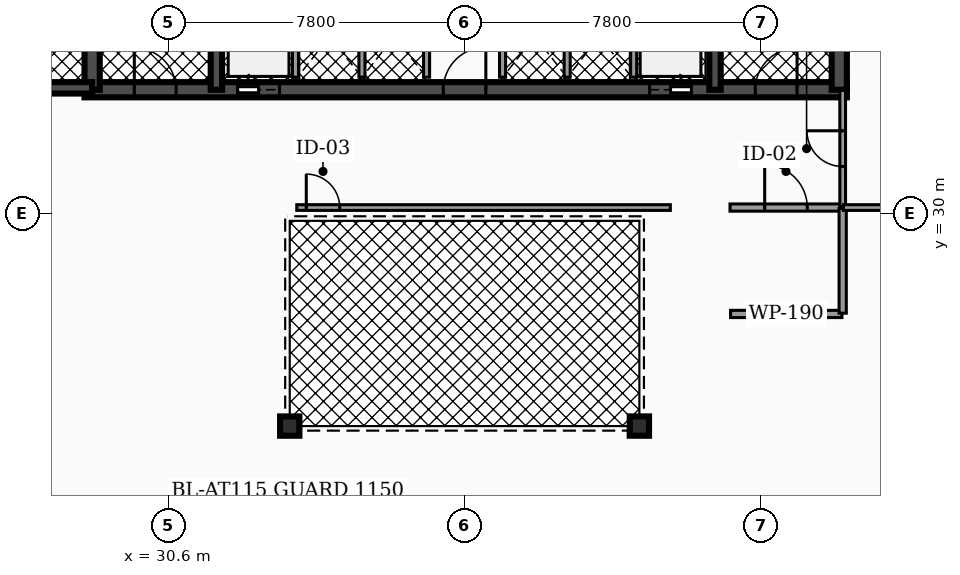
"""IFC4 building model, lengths in metres.
Left out: names, types, materials, properties, quantities, classifications, styles, units other than length and angle.
Written with IfcOpenShell. Run it as: python <this file> out.ifc"""

import sys

from ifc_helpers import new_model, si_unit, direction, frame, frame_2d, origin, origin_2d, place, context, subcontext, project, spatial, rectangle, hollow_circle, extrude, element, fill, save


model = new_model("IFC4")
c1 = context("Model", 3, precision=1e-05, world=origin(), true_north=direction((0.0, 1.0)))
c2 = subcontext(c1, "Body", "Model", "MODEL_VIEW")
j1 = project(units=[si_unit("LENGTHUNIT", "METRE"), si_unit("PLANEANGLEUNIT", "RADIAN")], contexts=[c1])
p1 = place(None, origin())
s1 = spatial("IfcSite", under=j1, at=p1, CompositionType="ELEMENT")
p2 = place(p1, origin())
s2 = spatial("IfcBuilding", under=s1, at=p2, CompositionType="ELEMENT")
p3 = place(p2, frame((0.0, 0.0, 43.86)))
s3 = spatial("IfcBuildingStorey", under=s2, at=p3, CompositionType="ELEMENT", Elevation=43.86)
p4 = place(p3, frame((28.4, 33.25, 0.0), z_axis=(0.0, 0.0, 1.0), x_axis=(1.0, 0.0, 0.0)))
e1 = element("IfcWall", 1, at=p4, inside=s3, PredefinedType="SHEAR", context=c2, shape_type="SweptSolid", body=[
    extrude(rectangle(XDim=20.06, YDim=0.4, at=frame_2d((10.03, 0.0))), origin(), (0.0, 0.0, 1.0), 3.82),
])
p5 = place(p4, frame((4.03, 0.0, 0.0)))
e2 = element("IfcOpeningElement", 2, at=p5, cuts=e1, PredefinedType="OPENING", context=c2, shape_type="SweptSolid", body=[
    extrude(rectangle(XDim=1.1, YDim=2.15, at=frame_2d((0.55, 1.075))), frame((0.0, 0.21, 0.0), z_axis=(0.0, -1.0, 0.0), x_axis=(1.0, 0.0, 0.0)), (0.0, 0.0, 1.0), 0.42),
])
p6 = place(p4, frame((14.87, 0.0, 0.0)))
e3 = element("IfcOpeningElement", 3, at=p6, cuts=e1, PredefinedType="OPENING", context=c2, shape_type="SweptSolid", body=[
    extrude(rectangle(XDim=1.1, YDim=2.15, at=frame_2d((0.55, 1.075))), frame((0.0, 0.21, 0.0), z_axis=(0.0, -1.0, 0.0), x_axis=(1.0, 0.0, 0.0)), (0.0, 0.0, 1.0), 0.42),
])
p7 = place(p4, frame((1.31, 0.0, 0.0)))
e4 = element("IfcOpeningElement", 4, at=p7, cuts=e1, PredefinedType="OPENING", context=c2, shape_type="SweptSolid", body=[
    extrude(rectangle(XDim=1.1, YDim=2.2, at=frame_2d((0.55, 1.1))), frame((0.0, 0.21, 0.0), z_axis=(0.0, -1.0, 0.0), x_axis=(1.0, 0.0, 0.0)), (0.0, 0.0, 1.0), 0.42),
])
p8 = place(p4, frame((9.44, 0.0, 0.0)))
e5 = element("IfcOpeningElement", 5, at=p8, cuts=e1, PredefinedType="OPENING", context=c2, shape_type="SweptSolid", body=[
    extrude(rectangle(XDim=1.12, YDim=2.05, at=frame_2d((0.56, 1.025))), frame((0.0, 0.21, 0.0), z_axis=(0.0, -1.0, 0.0), x_axis=(1.0, 0.0, 0.0)), (0.0, 0.0, 1.0), 0.42),
])
p9 = place(p4, frame((17.65, 0.0, 0.0)))
e6 = element("IfcOpeningElement", 6, at=p9, cuts=e1, PredefinedType="OPENING", context=c2, shape_type="SweptSolid", body=[
    extrude(rectangle(XDim=1.1, YDim=2.2, at=frame_2d((0.55, 1.1))), frame((0.0, 0.21, 0.0), z_axis=(0.0, -1.0, 0.0), x_axis=(1.0, 0.0, 0.0)), (0.0, 0.0, 1.0), 0.42),
])
p10 = place(p3, frame((28.6, 33.25, 0.0), z_axis=(0.0, 0.0, 1.0), x_axis=(0.0, 1.0, 0.0)))
e7 = element("IfcWall", 7, at=p10, inside=s3, PredefinedType="SHEAR", context=c2, shape_type="SweptSolid", body=[
    extrude(rectangle(XDim=10.2, YDim=0.4, at=frame_2d((5.1, 0.0))), origin(), (0.0, 0.0, 1.0), 3.82),
])
for number, where, z_axis, x_axis in (
    (8, (31.87, 33.25, 0.0), (0.0, 0.0, 1.0), (0.0, 1.0, 0.0)),
    (9, (44.99, 33.25, 0.0), (0.0, 0.0, 1.0), (0.0, 1.0, 0.0)),
):
    element("IfcWall", number, at=place(p3, frame(where, z_axis=z_axis, x_axis=x_axis)), inside=s3, PredefinedType="SHEAR", context=c2, shape_type="SweptSolid", body=[
        extrude(rectangle(XDim=10.2, YDim=0.3, at=frame_2d((5.1, 0.0))), origin(), (0.0, 0.0, 1.0), 3.82),
    ])
p11 = place(p3, frame((48.26, 33.25, 0.0), z_axis=(0.0, 0.0, 1.0), x_axis=(0.0, 1.0, 0.0)))
e10 = element("IfcWall", 10, at=p11, inside=s3, PredefinedType="SHEAR", context=c2, shape_type="SweptSolid", body=[
    extrude(rectangle(XDim=10.2, YDim=0.4, at=frame_2d((5.1, 0.0))), origin(), (0.0, 0.0, 1.0), 3.82),
])
p12 = place(p3, frame((25.08, 33.3, 0.0), z_axis=(0.0, 0.0, 1.0), x_axis=(1.0, 0.0, 0.0)))
e11 = element("IfcWall", 11, at=p12, inside=s3, PredefinedType="SHEAR", context=c2, shape_type="SweptSolid", body=[
    extrude(rectangle(XDim=3.52, YDim=0.3, at=frame_2d((1.76, 0.0))), origin(), (0.0, 0.0, 1.0), 3.82),
])
p13 = place(p12, frame((1.335, 0.0, 0.0)))
e12 = element("IfcOpeningElement", 12, at=p13, cuts=e11, PredefinedType="OPENING", context=c2, shape_type="SweptSolid", body=[
    extrude(rectangle(XDim=0.95, YDim=2.2, at=frame_2d((0.475, 1.1))), frame((0.0, 0.16, 0.0), z_axis=(0.0, -1.0, 0.0), x_axis=(1.0, 0.0, 0.0)), (0.0, 0.0, 1.0), 0.32),
])
for number, where, z_axis, x_axis in (
    (13, (33.8, 24.4, 0.0), (0.0, 0.0, 1.0), (1.0, 0.0, 0.0)),
    (14, (43.0, 24.4, 0.0), (0.0, 0.0, 1.0), (1.0, 0.0, 0.0)),
):
    element("IfcColumn", number, at=place(p3, frame(where, z_axis=z_axis, x_axis=x_axis)), inside=s3, PredefinedType="COLUMN", context=c2, shape_type="SweptSolid", body=[
        extrude(hollow_circle(Radius=0.254, WallThickness=0.02, at=origin_2d()), origin(), (0.0, 0.0, 1.0), 3.82),
    ])
for number, where, z_axis, x_axis in (
    (15, (33.95, 33.58, 0.0), (0.0, 0.0, 1.0), (0.0, 1.0, 0.0)),
    (16, (42.85, 33.58, 0.0), (0.0, 0.0, 1.0), (0.0, 1.0, 0.0)),
):
    element("IfcWall", number, at=place(p3, frame(where, z_axis=z_axis, x_axis=x_axis)), inside=s3, PredefinedType="SOLIDWALL", context=c2, shape_type="SweptSolid", body=[
        extrude(rectangle(XDim=2.45, YDim=0.16, at=frame_2d((1.225, 0.0))), origin(), (0.0, 0.0, 1.0), 2.792),
    ])
for number, where, z_axis, x_axis in (
    (17, (35.7, 33.58, 0.0), (0.0, 0.0, 1.0), (0.0, 1.0, 0.0)),
    (18, (37.4, 33.58, 0.0), (0.0, 0.0, 1.0), (0.0, 1.0, 0.0)),
    (19, (39.4, 33.58, 0.0), (0.0, 0.0, 1.0), (0.0, 1.0, 0.0)),
    (20, (41.1, 33.58, 0.0), (0.0, 0.0, 1.0), (0.0, 1.0, 0.0)),
):
    element("IfcWall", number, at=place(p3, frame(where, z_axis=z_axis, x_axis=x_axis)), inside=s3, PredefinedType="SOLIDWALL", context=c2, shape_type="SweptSolid", body=[
        extrude(rectangle(XDim=2.25, YDim=0.16, at=frame_2d((1.125, 0.0))), origin(), (0.0, 0.0, 1.0), 2.792),
    ])
p14 = place(p3, frame((45.385, 30.15, 0.0), z_axis=(0.0, 0.0, 1.0), x_axis=(1.0, 0.0, 0.0)))
e21 = element("IfcWall", 21, at=p14, inside=s3, PredefinedType="PARTITIONING", context=c2, shape_type="SweptSolid", body=[
    extrude(rectangle(XDim=2.945, YDim=0.19, at=frame_2d((1.473, 0.0))), origin(), (0.0, 0.0, 1.0), 2.777),
])
p15 = place(p14, frame((0.913, 0.0, 0.0)))
e22 = element("IfcOpeningElement", 22, at=p15, cuts=e21, PredefinedType="OPENING", context=c2, shape_type="SweptSolid", body=[
    extrude(rectangle(XDim=1.12, YDim=2.05, at=frame_2d((0.56, 1.025))), frame((0.0, 0.105, 0.0), z_axis=(0.0, -1.0, 0.0), x_axis=(1.0, 0.0, 0.0)), (0.0, 0.0, 1.0), 0.21),
])
p16 = place(p3, frame((48.35, 30.17, 0.0), z_axis=(0.0, 0.0, 1.0), x_axis=(0.0, 1.0, 0.0)))
e23 = element("IfcWall", 23, at=p16, inside=s3, PredefinedType="PARTITIONING", context=c2, shape_type="SweptSolid", body=[
    extrude(rectangle(XDim=3.06, YDim=0.15, at=frame_2d((1.53, 0.0))), origin(), (0.0, 0.0, 1.0), 2.777),
])
p17 = place(p16, frame((1.06, 0.0, 0.0)))
e24 = element("IfcOpeningElement", 24, at=p17, cuts=e23, PredefinedType="OPENING", context=c2, shape_type="SweptSolid", body=[
    extrude(rectangle(XDim=0.94, YDim=2.05, at=frame_2d((0.47, 1.025))), frame((0.0, 0.085, 0.0), z_axis=(0.0, -1.0, 0.0), x_axis=(1.0, 0.0, 0.0)), (0.0, 0.0, 1.0), 0.17),
])
p18 = place(p3, frame((33.985, 30.15, 0.0), z_axis=(0.0, 0.0, 1.0), x_axis=(1.0, 0.0, 0.0)))
e25 = element("IfcWall", 25, at=p18, inside=s3, PredefinedType="PARTITIONING", context=c2, shape_type="SweptSolid", body=[
    extrude(rectangle(XDim=9.83, YDim=0.15, at=frame_2d((4.915, 0.0))), origin(), (0.0, 0.0, 1.0), 2.777),
])
p19 = place(p18, frame((0.25, 0.0, 0.0)))
e26 = element("IfcOpeningElement", 26, at=p19, cuts=e25, PredefinedType="OPENING", context=c2, shape_type="SweptSolid", body=[
    extrude(rectangle(XDim=0.88, YDim=2.05, at=frame_2d((0.44, 1.025))), frame((0.0, 0.085, 0.0), z_axis=(0.0, -1.0, 0.0), x_axis=(1.0, 0.0, 0.0)), (0.0, 0.0, 1.0), 0.17),
])
p20 = place(p3, frame((45.4, 27.35, 0.0), z_axis=(0.0, 0.0, 1.0), x_axis=(1.0, 0.0, 0.0)))
e27 = element("IfcWall", 27, at=p20, inside=s3, PredefinedType="PARTITIONING", context=c2, shape_type="SweptSolid", body=[
    extrude(rectangle(XDim=2.93, YDim=0.19, at=frame_2d((1.465, 0.0))), origin(), (0.0, 0.0, 1.0), 2.777),
])
p21 = place(p3, frame((48.35, 27.37, 0.0), z_axis=(0.0, 0.0, 1.0), x_axis=(0.0, 1.0, 0.0)))
e28 = element("IfcWall", 28, at=p21, inside=s3, PredefinedType="PARTITIONING", context=c2, shape_type="SweptSolid", body=[
    extrude(rectangle(XDim=2.76, YDim=0.19, at=frame_2d((1.38, 0.0))), origin(), (0.0, 0.0, 1.0), 2.777),
])
p22 = place(p3, frame((48.37, 30.15, 0.0), z_axis=(0.0, 0.0, 1.0), x_axis=(1.0, 0.0, 0.0)))
e29 = element("IfcWall", 29, at=p22, inside=s3, PredefinedType="PARTITIONING", context=c2, shape_type="SweptSolid", body=[
    extrude(rectangle(XDim=2.06, YDim=0.15, at=frame_2d((1.03, 0.0))), origin(), (0.0, 0.0, 1.0), 2.777),
])
p23 = place(p5, origin())
e30 = element("IfcDoor", 30, at=p23, inside=s3, OperationType="SLIDING_TO_LEFT", PredefinedType="DOOR", context=c2, shape_type="SweptSolid", body=[
    extrude(rectangle(XDim=1.1, YDim=2.15, at=frame_2d((0.55, 1.075))), frame((0.0, 0.025, 0.0), z_axis=(0.0, -1.0, 0.0), x_axis=(1.0, 0.0, 0.0)), (0.0, 0.0, 1.0), 0.05),
])
fill(e2, e30)
p24 = place(p6, origin())
e31 = element("IfcDoor", 31, at=p24, inside=s3, OperationType="SLIDING_TO_RIGHT", PredefinedType="DOOR", context=c2, shape_type="SweptSolid", body=[
    extrude(rectangle(XDim=1.1, YDim=2.15, at=frame_2d((0.55, 1.075))), frame((0.0, 0.025, 0.0), z_axis=(0.0, -1.0, 0.0), x_axis=(1.0, 0.0, 0.0)), (0.0, 0.0, 1.0), 0.05),
])
fill(e3, e31)
p25 = place(p7, origin())
e32 = element("IfcDoor", 32, at=p25, inside=s3, OperationType="SINGLE_SWING_LEFT", PredefinedType="DOOR", context=c2, shape_type="SweptSolid", body=[
    extrude(rectangle(XDim=1.1, YDim=2.2, at=frame_2d((0.55, 1.1))), frame((0.0, 0.025, 0.0), z_axis=(0.0, -1.0, 0.0), x_axis=(1.0, 0.0, 0.0)), (0.0, 0.0, 1.0), 0.05),
])
fill(e4, e32)
p26 = place(p8, origin())
e33 = element("IfcDoor", 33, at=p26, inside=s3, OperationType="SINGLE_SWING_RIGHT", PredefinedType="DOOR", context=c2, shape_type="SweptSolid", body=[
    extrude(rectangle(XDim=1.12, YDim=2.05, at=frame_2d((0.56, 1.025))), frame((0.0, 0.025, 0.0), z_axis=(0.0, -1.0, 0.0), x_axis=(1.0, 0.0, 0.0)), (0.0, 0.0, 1.0), 0.05),
])
fill(e5, e33)
p27 = place(p9, origin())
e34 = element("IfcDoor", 34, at=p27, inside=s3, OperationType="SINGLE_SWING_RIGHT", PredefinedType="DOOR", context=c2, shape_type="SweptSolid", body=[
    extrude(rectangle(XDim=1.1, YDim=2.2, at=frame_2d((0.55, 1.1))), frame((0.0, 0.025, 0.0), z_axis=(0.0, -1.0, 0.0), x_axis=(1.0, 0.0, 0.0)), (0.0, 0.0, 1.0), 0.05),
])
fill(e6, e34)
p28 = place(p15, origin())
e35 = element("IfcDoor", 35, at=p28, inside=s3, OperationType="SINGLE_SWING_LEFT", PredefinedType="DOOR", context=c2, shape_type="SweptSolid", body=[
    extrude(rectangle(XDim=1.12, YDim=2.05, at=frame_2d((0.56, 1.025))), frame((0.0, 0.025, 0.0), z_axis=(0.0, -1.0, 0.0), x_axis=(1.0, 0.0, 0.0)), (0.0, 0.0, 1.0), 0.05),
])
fill(e22, e35)
p29 = place(p17, origin())
e36 = element("IfcDoor", 36, at=p29, inside=s3, OperationType="SINGLE_SWING_RIGHT", PredefinedType="DOOR", context=c2, shape_type="SweptSolid", body=[
    extrude(rectangle(XDim=0.94, YDim=2.05, at=frame_2d((0.47, 1.025))), frame((0.0, 0.025, 0.0), z_axis=(0.0, -1.0, 0.0), x_axis=(1.0, 0.0, 0.0)), (0.0, 0.0, 1.0), 0.05),
])
fill(e24, e36)
p30 = place(p19, origin())
e37 = element("IfcDoor", 37, at=p30, inside=s3, OperationType="SINGLE_SWING_LEFT", PredefinedType="DOOR", context=c2, shape_type="SweptSolid", body=[
    extrude(rectangle(XDim=0.88, YDim=2.05, at=frame_2d((0.44, 1.025))), frame((0.0, 0.025, 0.0), z_axis=(0.0, -1.0, 0.0), x_axis=(1.0, 0.0, 0.0)), (0.0, 0.0, 1.0), 0.05),
])
fill(e26, e37)
save(model, sys.argv[1])
